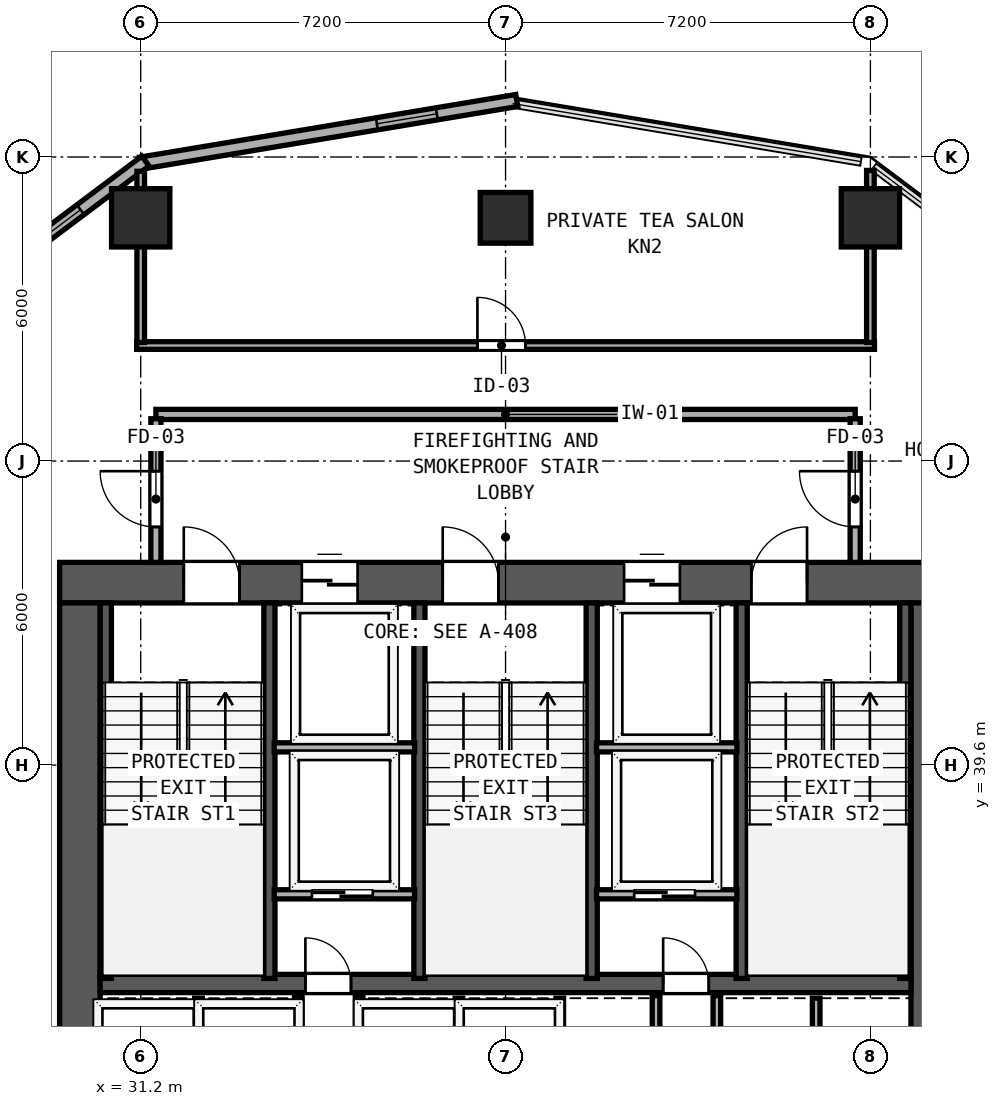
"""IFC4 building model, lengths in metres.
Left out: names, types, materials, properties, quantities, classifications, styles, units other than length and angle.
Written with IfcOpenShell. Run it as: python <this file> out.ifc"""

import sys

from ifc_helpers import new_model, si_unit, direction, frame, frame_2d, origin, origin_2d, place, context, subcontext, project, spatial, rectangle, hollow_rectangle, extrude, element, fill, save


model = new_model("IFC4")
c1 = context("Model", 3, precision=1e-05, world=origin(), true_north=direction((0.0, 1.0)))
c2 = subcontext(c1, "Body", "Model", "MODEL_VIEW")
j1 = project(units=[si_unit("LENGTHUNIT", "METRE"), si_unit("PLANEANGLEUNIT", "RADIAN")], contexts=[c1])
p1 = place(None, origin())
s1 = spatial("IfcSite", under=j1, at=p1, CompositionType="ELEMENT")
p2 = place(p1, origin())
s2 = spatial("IfcBuilding", under=s1, at=p2, CompositionType="ELEMENT")
p3 = place(p2, frame((0.0, 0.0, 55.2)))
s3 = spatial("IfcBuildingStorey", under=s2, at=p3, CompositionType="ELEMENT", Elevation=55.2)
p4 = place(p3, frame((29.6, 43.2, 0.0), z_axis=(0.0, 0.0, 1.0), x_axis=(1.0, 0.0, 0.0)))
e1 = element("IfcWall", 1, at=p4, inside=s3, PredefinedType="SHEAR", context=c2, shape_type="SweptSolid", body=[
    extrude(rectangle(XDim=17.6, YDim=0.8, at=frame_2d((8.8, 0.0))), origin(), (0.0, 0.0, 1.0), 3.6),
])
p5 = place(p4, frame((2.45, 0.0, 0.0)))
e2 = element("IfcOpeningElement", 2, at=p5, cuts=e1, PredefinedType="OPENING", context=c2, shape_type="SweptSolid", body=[
    extrude(rectangle(XDim=1.1, YDim=2.15, at=frame_2d((0.55, 1.075))), frame((0.0, 0.41, 0.0), z_axis=(0.0, -1.0, 0.0), x_axis=(1.0, 0.0, 0.0)), (0.0, 0.0, 1.0), 0.82),
])
p6 = place(p4, frame((7.56, 0.0, 0.0)))
e3 = element("IfcOpeningElement", 3, at=p6, cuts=e1, PredefinedType="OPENING", context=c2, shape_type="SweptSolid", body=[
    extrude(rectangle(XDim=1.1, YDim=2.15, at=frame_2d((0.55, 1.075))), frame((0.0, 0.41, 0.0), z_axis=(0.0, -1.0, 0.0), x_axis=(1.0, 0.0, 0.0)), (0.0, 0.0, 1.0), 0.82),
])
p7 = place(p4, frame((13.65, 0.0, 0.0)))
e4 = element("IfcOpeningElement", 4, at=p7, cuts=e1, PredefinedType="OPENING", context=c2, shape_type="SweptSolid", body=[
    extrude(rectangle(XDim=1.1, YDim=2.15, at=frame_2d((0.55, 1.075))), frame((0.0, 0.41, 0.0), z_axis=(0.0, -1.0, 0.0), x_axis=(1.0, 0.0, 0.0)), (0.0, 0.0, 1.0), 0.82),
])
p8 = place(p4, frame((4.78, 0.0, 0.0)))
e5 = element("IfcOpeningElement", 5, at=p8, cuts=e1, PredefinedType="OPENING", context=c2, shape_type="SweptSolid", body=[
    extrude(rectangle(XDim=1.1, YDim=2.2, at=frame_2d((0.55, 1.1))), frame((0.0, 0.41, 0.0), z_axis=(0.0, -1.0, 0.0), x_axis=(1.0, 0.0, 0.0)), (0.0, 0.0, 1.0), 0.82),
])
p9 = place(p4, frame((11.14, 0.0, 0.0)))
e6 = element("IfcOpeningElement", 6, at=p9, cuts=e1, PredefinedType="OPENING", context=c2, shape_type="SweptSolid", body=[
    extrude(rectangle(XDim=1.1, YDim=2.2, at=frame_2d((0.55, 1.1))), frame((0.0, 0.41, 0.0), z_axis=(0.0, -1.0, 0.0), x_axis=(1.0, 0.0, 0.0)), (0.0, 0.0, 1.0), 0.82),
])
for number, where, z_axis, x_axis in (
    (7, (30.0, 32.8, 0.0), (0.0, 0.0, 1.0), (0.0, 1.0, 0.0)),
    (8, (46.8, 32.8, 0.0), (0.0, 0.0, 1.0), (0.0, 1.0, 0.0)),
):
    element("IfcWall", number, at=place(p3, frame(where, z_axis=z_axis, x_axis=x_axis)), inside=s3, PredefinedType="SHEAR", context=c2, shape_type="SweptSolid", body=[
        extrude(rectangle(XDim=10.0, YDim=0.8, at=frame_2d((5.0, 0.0))), origin(), (0.0, 0.0, 1.0), 3.6),
    ])
p10 = place(p3, frame((30.4, 35.29, 0.0), z_axis=(0.0, 0.0, 1.0), x_axis=(1.0, 0.0, 0.0)))
e9 = element("IfcWall", 9, at=p10, inside=s3, PredefinedType="SHEAR", context=c2, shape_type="SweptSolid", body=[
    extrude(rectangle(XDim=16.0, YDim=0.36, at=frame_2d((8.0, 0.0))), origin(), (0.0, 0.0, 1.0), 3.6),
])
p11 = place(p10, frame((4.95, 0.0, 0.0), z_axis=(0.0, 0.0, 1.0), x_axis=(-1.0, 0.0, 0.0)))
e10 = element("IfcOpeningElement", 10, at=p11, cuts=e9, PredefinedType="OPENING", context=c2, shape_type="SweptSolid", body=[
    extrude(rectangle(XDim=0.9, YDim=2.1, at=frame_2d((0.45, 1.05))), frame((0.0, 0.19, 0.0), z_axis=(0.0, -1.0, 0.0), x_axis=(1.0, 0.0, 0.0)), (0.0, 0.0, 1.0), 0.38),
])
p12 = place(p10, frame((12.01, 0.0, 0.0), z_axis=(0.0, 0.0, 1.0), x_axis=(-1.0, 0.0, 0.0)))
e11 = element("IfcOpeningElement", 11, at=p12, cuts=e9, PredefinedType="OPENING", context=c2, shape_type="SweptSolid", body=[
    extrude(rectangle(XDim=0.9, YDim=2.1, at=frame_2d((0.45, 1.05))), frame((0.0, 0.19, 0.0), z_axis=(0.0, -1.0, 0.0), x_axis=(1.0, 0.0, 0.0)), (0.0, 0.0, 1.0), 0.38),
])
for number, where, z_axis, x_axis in (
    (12, (30.512, 35.39, 0.0), (0.0, 0.0, 1.0), (0.0, 1.0, 0.0)),
    (13, (33.74, 35.39, 0.0), (0.0, 0.0, 1.0), (0.0, 1.0, 0.0)),
    (14, (36.7, 35.39, 0.0), (0.0, 0.0, 1.0), (0.0, 1.0, 0.0)),
    (15, (40.1, 35.39, 0.0), (0.0, 0.0, 1.0), (0.0, 1.0, 0.0)),
    (16, (43.06, 35.39, 0.0), (0.0, 0.0, 1.0), (0.0, 1.0, 0.0)),
    (17, (46.288, 35.39, 0.0), (0.0, 0.0, 1.0), (0.0, 1.0, 0.0)),
):
    element("IfcWall", number, at=place(p3, frame(where, z_axis=z_axis, x_axis=x_axis)), inside=s3, PredefinedType="SHEAR", context=c2, shape_type="SweptSolid", body=[
        extrude(rectangle(XDim=7.41, YDim=0.22, at=frame_2d((3.705, 0.0))), origin(), (0.0, 0.0, 1.0), 3.6),
    ])
for number, where, z_axis, x_axis in (
    (18, (31.2, 50.4, 0.0), (0.0, 0.0, 1.0), (1.0, 0.0, 0.0)),
    (19, (45.6, 50.4, 0.0), (0.0, 0.0, 1.0), (1.0, 0.0, 0.0)),
):
    element("IfcColumn", number, at=place(p3, frame(where, z_axis=z_axis, x_axis=x_axis)), inside=s3, PredefinedType="COLUMN", context=c2, shape_type="SweptSolid", body=[
        extrude(hollow_rectangle(XDim=1.15, YDim=1.15, WallThickness=0.042, at=origin_2d()), origin(), (0.0, 0.0, 1.0), 3.8),
    ])
p13 = place(p3, frame((38.4, 50.4, 0.0), z_axis=(0.0, 0.0, 1.0), x_axis=(1.0, 0.0, 0.0)))
e20 = element("IfcColumn", 20, at=p13, inside=s3, PredefinedType="COLUMN", context=c2, shape_type="SweptSolid", body=[
    extrude(hollow_rectangle(XDim=1.0, YDim=1.0, WallThickness=0.038, at=origin_2d()), origin(), (0.0, 0.0, 1.0), 3.8),
])
p14 = place(p3, frame((38.622, 52.715, 0.0), z_axis=(0.0, 0.0, 1.0), x_axis=(-0.98639129485, -0.164414760418, 0.0)))
e21 = element("IfcWall", 21, at=p14, inside=s3, PredefinedType="SOLIDWALL", context=c2, shape_type="SweptSolid", body=[
    extrude(rectangle(XDim=7.53, YDim=0.24, at=frame_2d((3.765, 0.0))), origin(), (0.0, 0.0, 1.0), 3.6),
])
p15 = place(p14, frame((1.6, 0.0, 0.85)))
e22 = element("IfcOpeningElement", 22, at=p15, cuts=e21, PredefinedType="OPENING", context=c2, shape_type="SweptSolid", body=[
    extrude(rectangle(XDim=1.2, YDim=1.85, at=frame_2d((0.6, 0.925))), frame((0.0, 0.13, 0.0), z_axis=(0.0, -1.0, 0.0), x_axis=(1.0, 0.0, 0.0)), (0.0, 0.0, 1.0), 0.26),
])
p16 = place(p3, frame((31.292, 51.519, 0.0), z_axis=(0.0, 0.0, 1.0), x_axis=(-0.8, -0.6, 0.0)))
e23 = element("IfcWall", 23, at=p16, inside=s3, PredefinedType="SOLIDWALL", context=c2, shape_type="SweptSolid", body=[
    extrude(rectangle(XDim=6.021, YDim=0.24, at=frame_2d((3.01, 0.0))), origin(), (0.0, 0.0, 1.0), 3.6),
])
p17 = place(p16, frame((1.6, 0.0, 0.85)))
e24 = element("IfcOpeningElement", 24, at=p17, cuts=e23, PredefinedType="OPENING", context=c2, shape_type="SweptSolid", body=[
    extrude(rectangle(XDim=1.2, YDim=1.85, at=frame_2d((0.6, 0.925))), frame((0.0, 0.13, 0.0), z_axis=(0.0, -1.0, 0.0), x_axis=(1.0, 0.0, 0.0)), (0.0, 0.0, 1.0), 0.26),
])
p18 = place(p3, frame((31.5, 46.52, 0.0), z_axis=(0.0, 0.0, 1.0), x_axis=(1.0, 0.0, 0.0)))
e25 = element("IfcWall", 25, at=p18, inside=s3, PredefinedType="SOLIDWALL", context=c2, shape_type="SweptSolid", body=[
    extrude(rectangle(XDim=13.8, YDim=0.2, at=frame_2d((6.9, 0.0))), origin(), (0.0, 0.0, 1.0), 3.6),
])
p19 = place(p3, frame((31.5, 43.6, 0.0), z_axis=(0.0, 0.0, 1.0), x_axis=(0.0, 1.0, 0.0)))
e26 = element("IfcWall", 26, at=p19, inside=s3, PredefinedType="SOLIDWALL", context=c2, shape_type="SweptSolid", body=[
    extrude(rectangle(XDim=2.835, YDim=0.2, at=frame_2d((1.417, 0.0))), origin(), (0.0, 0.0, 1.0), 3.6),
])
p20 = place(p19, frame((1.8, 0.0, 0.0), z_axis=(0.0, 0.0, 1.0), x_axis=(-1.0, 0.0, 0.0)))
e27 = element("IfcOpeningElement", 27, at=p20, cuts=e26, PredefinedType="OPENING", context=c2, shape_type="SweptSolid", body=[
    extrude(rectangle(XDim=1.1, YDim=2.15, at=frame_2d((0.55, 1.075))), frame((0.0, 0.11, 0.0), z_axis=(0.0, -1.0, 0.0), x_axis=(1.0, 0.0, 0.0)), (0.0, 0.0, 1.0), 0.22),
])
p21 = place(p3, frame((45.3, 43.6, 0.0), z_axis=(0.0, 0.0, 1.0), x_axis=(0.0, 1.0, 0.0)))
e28 = element("IfcWall", 28, at=p21, inside=s3, PredefinedType="SOLIDWALL", context=c2, shape_type="SweptSolid", body=[
    extrude(rectangle(XDim=2.835, YDim=0.2, at=frame_2d((1.417, 0.0))), origin(), (0.0, 0.0, 1.0), 3.6),
])
p22 = place(p21, frame((0.7, 0.0, 0.0)))
e29 = element("IfcOpeningElement", 29, at=p22, cuts=e28, PredefinedType="OPENING", context=c2, shape_type="SweptSolid", body=[
    extrude(rectangle(XDim=1.1, YDim=2.15, at=frame_2d((0.55, 1.075))), frame((0.0, 0.11, 0.0), z_axis=(0.0, -1.0, 0.0), x_axis=(1.0, 0.0, 0.0)), (0.0, 0.0, 1.0), 0.22),
])
for number, where, z_axis, x_axis in (
    (30, (33.835, 39.95, 0.0), (0.0, 0.0, 1.0), (1.0, 0.0, 0.0)),
    (31, (40.195, 39.95, 0.0), (0.0, 0.0, 1.0), (1.0, 0.0, 0.0)),
):
    element("IfcWall", number, at=place(p3, frame(where, z_axis=z_axis, x_axis=x_axis)), inside=s3, PredefinedType="SOLIDWALL", context=c2, shape_type="SweptSolid", body=[
        extrude(rectangle(XDim=2.77, YDim=0.18, at=frame_2d((1.385, 0.0))), origin(), (0.0, 0.0, 1.0), 3.6),
    ])
p23 = place(p3, frame((33.835, 37.05, 0.0), z_axis=(0.0, 0.0, 1.0), x_axis=(1.0, 0.0, 0.0)))
e32 = element("IfcWall", 32, at=p23, inside=s3, PredefinedType="SOLIDWALL", context=c2, shape_type="SweptSolid", body=[
    extrude(rectangle(XDim=2.77, YDim=0.18, at=frame_2d((1.385, 0.0))), origin(), (0.0, 0.0, 1.0), 3.6),
])
p24 = place(p23, frame((1.945, 0.0, 0.0), z_axis=(0.0, 0.0, 1.0), x_axis=(-1.0, 0.0, 0.0)))
e33 = element("IfcOpeningElement", 33, at=p24, cuts=e32, PredefinedType="OPENING", context=c2, shape_type="SweptSolid", body=[
    extrude(rectangle(XDim=1.2, YDim=2.2, at=frame_2d((0.6, 1.1))), frame((0.0, 0.1, 0.0), z_axis=(0.0, -1.0, 0.0), x_axis=(1.0, 0.0, 0.0)), (0.0, 0.0, 1.0), 0.2),
])
for number, where, z_axis, x_axis in (
    (34, (34.31, 32.88, 0.0), (0.0, 0.0, 1.0), (0.0, 1.0, 0.0)),
    (35, (35.51, 32.88, 0.0), (0.0, 0.0, 1.0), (0.0, 1.0, 0.0)),
):
    element("IfcWall", number, at=place(p3, frame(where, z_axis=z_axis, x_axis=x_axis)), inside=s3, PredefinedType="SOLIDWALL", context=c2, shape_type="SweptSolid", body=[
        extrude(rectangle(XDim=2.17, YDim=0.15, at=frame_2d((1.085, 0.0))), origin(), (0.0, 0.0, 1.0), 3.6),
    ])
p25 = place(p3, frame((40.195, 37.05, 0.0), z_axis=(0.0, 0.0, 1.0), x_axis=(1.0, 0.0, 0.0)))
e36 = element("IfcWall", 36, at=p25, inside=s3, PredefinedType="SOLIDWALL", context=c2, shape_type="SweptSolid", body=[
    extrude(rectangle(XDim=2.77, YDim=0.18, at=frame_2d((1.385, 0.0))), origin(), (0.0, 0.0, 1.0), 3.6),
])
p26 = place(p25, frame((1.945, 0.0, 0.0), z_axis=(0.0, 0.0, 1.0), x_axis=(-1.0, 0.0, 0.0)))
e37 = element("IfcOpeningElement", 37, at=p26, cuts=e36, PredefinedType="OPENING", context=c2, shape_type="SweptSolid", body=[
    extrude(rectangle(XDim=1.2, YDim=2.2, at=frame_2d((0.6, 1.1))), frame((0.0, 0.1, 0.0), z_axis=(0.0, -1.0, 0.0), x_axis=(1.0, 0.0, 0.0)), (0.0, 0.0, 1.0), 0.2),
])
for number, where, z_axis, x_axis in (
    (38, (41.37, 32.88, 0.0), (0.0, 0.0, 1.0), (0.0, 1.0, 0.0)),
    (39, (42.57, 32.88, 0.0), (0.0, 0.0, 1.0), (0.0, 1.0, 0.0)),
):
    element("IfcWall", number, at=place(p3, frame(where, z_axis=z_axis, x_axis=x_axis)), inside=s3, PredefinedType="SOLIDWALL", context=c2, shape_type="SweptSolid", body=[
        extrude(rectangle(XDim=2.17, YDim=0.15, at=frame_2d((1.085, 0.0))), origin(), (0.0, 0.0, 1.0), 3.6),
    ])
for number, where, z_axis, x_axis in (
    (40, (32.34, 32.95, 0.0), (0.0, 0.0, 1.0), (0.0, 1.0, 0.0)),
    (41, (37.48, 32.95, 0.0), (0.0, 0.0, 1.0), (0.0, 1.0, 0.0)),
    (42, (39.47, 32.95, 0.0), (0.0, 0.0, 1.0), (0.0, 1.0, 0.0)),
    (43, (44.53, 32.95, 0.0), (0.0, 0.0, 1.0), (0.0, 1.0, 0.0)),
):
    element("IfcWall", number, at=place(p3, frame(where, z_axis=z_axis, x_axis=x_axis)), inside=s3, PredefinedType="SOLIDWALL", context=c2, shape_type="SweptSolid", body=[
        extrude(rectangle(XDim=2.05, YDim=0.15, at=frame_2d((1.025, 0.0))), origin(), (0.0, 0.0, 1.0), 3.6),
    ])
p27 = place(p3, frame((31.12, 47.88, 0.0), z_axis=(0.0, 0.0, 1.0), x_axis=(1.0, 0.0, 0.0)))
e44 = element("IfcWall", 44, at=p27, inside=s3, PredefinedType="PARTITIONING", context=c2, shape_type="SweptSolid", body=[
    extrude(rectangle(XDim=14.56, YDim=0.15, at=frame_2d((7.28, 0.0))), origin(), (0.0, 0.0, 1.0), 3.6),
])
p28 = place(p27, frame((6.725, 0.0, 0.0)))
e45 = element("IfcOpeningElement", 45, at=p28, cuts=e44, PredefinedType="OPENING", context=c2, shape_type="SweptSolid", body=[
    extrude(rectangle(XDim=0.95, YDim=2.12, at=frame_2d((0.475, 1.06))), frame((0.0, 0.085, 0.0), z_axis=(0.0, -1.0, 0.0), x_axis=(1.0, 0.0, 0.0)), (0.0, 0.0, 1.0), 0.17),
])
p29 = place(p3, frame((31.2, 47.94, 0.0), z_axis=(0.0, 0.0, 1.0), x_axis=(0.0, 1.0, 0.0)))
e46 = element("IfcWall", 46, at=p29, inside=s3, PredefinedType="PARTITIONING", context=c2, shape_type="SweptSolid", body=[
    extrude(rectangle(XDim=3.379, YDim=0.15, at=frame_2d((1.689, 0.0))), origin(), (0.0, 0.0, 1.0), 2.985),
])
p30 = place(p3, frame((45.6, 47.94, 0.0), z_axis=(0.0, 0.0, 1.0), x_axis=(0.0, 1.0, 0.0)))
e47 = element("IfcWall", 47, at=p30, inside=s3, PredefinedType="PARTITIONING", context=c2, shape_type="SweptSolid", body=[
    extrude(rectangle(XDim=3.395, YDim=0.15, at=frame_2d((1.698, 0.0))), origin(), (0.0, 0.0, 1.0), 2.985),
])
p31 = place(p15, origin())
e48 = element("IfcWindow", 48, at=p31, inside=s3, PartitioningType="SINGLE_PANEL", PredefinedType="WINDOW", context=c2, shape_type="SweptSolid", body=[
    extrude(rectangle(XDim=1.2, YDim=1.85, at=frame_2d((0.6, 0.925))), frame((0.0, 0.03, 0.0), z_axis=(0.0, -1.0, 0.0), x_axis=(1.0, 0.0, 0.0)), (0.0, 0.0, 1.0), 0.06),
])
fill(e22, e48)
p32 = place(p17, origin())
e49 = element("IfcWindow", 49, at=p32, inside=s3, PartitioningType="SINGLE_PANEL", PredefinedType="WINDOW", context=c2, shape_type="SweptSolid", body=[
    extrude(rectangle(XDim=1.2, YDim=1.85, at=frame_2d((0.6, 0.925))), frame((0.0, 0.03, 0.0), z_axis=(0.0, -1.0, 0.0), x_axis=(1.0, 0.0, 0.0)), (0.0, 0.0, 1.0), 0.06),
])
fill(e24, e49)
p33 = place(p5, origin())
e50 = element("IfcDoor", 50, at=p33, inside=s3, OperationType="SINGLE_SWING_LEFT", PredefinedType="DOOR", context=c2, shape_type="SweptSolid", body=[
    extrude(rectangle(XDim=1.1, YDim=2.15, at=frame_2d((0.55, 1.075))), frame((0.0, 0.185, 0.0), z_axis=(0.0, -1.0, 0.0), x_axis=(1.0, 0.0, 0.0)), (0.0, 0.0, 1.0), 0.05),
])
fill(e2, e50)
p34 = place(p6, origin())
e51 = element("IfcDoor", 51, at=p34, inside=s3, OperationType="SINGLE_SWING_LEFT", PredefinedType="DOOR", context=c2, shape_type="SweptSolid", body=[
    extrude(rectangle(XDim=1.1, YDim=2.15, at=frame_2d((0.55, 1.075))), frame((0.0, 0.185, 0.0), z_axis=(0.0, -1.0, 0.0), x_axis=(1.0, 0.0, 0.0)), (0.0, 0.0, 1.0), 0.05),
])
fill(e3, e51)
p35 = place(p7, origin())
e52 = element("IfcDoor", 52, at=p35, inside=s3, OperationType="SINGLE_SWING_RIGHT", PredefinedType="DOOR", context=c2, shape_type="SweptSolid", body=[
    extrude(rectangle(XDim=1.1, YDim=2.15, at=frame_2d((0.55, 1.075))), frame((0.0, 0.185, 0.0), z_axis=(0.0, -1.0, 0.0), x_axis=(1.0, 0.0, 0.0)), (0.0, 0.0, 1.0), 0.05),
])
fill(e4, e52)
p36 = place(p20, origin())
e53 = element("IfcDoor", 53, at=p36, inside=s3, OperationType="SINGLE_SWING_LEFT", PredefinedType="DOOR", context=c2, shape_type="SweptSolid", body=[
    extrude(rectangle(XDim=1.1, YDim=2.15, at=frame_2d((0.55, 1.075))), frame((0.0, 0.025, 0.0), z_axis=(0.0, -1.0, 0.0), x_axis=(1.0, 0.0, 0.0)), (0.0, 0.0, 1.0), 0.05),
])
fill(e27, e53)
p37 = place(p22, origin())
e54 = element("IfcDoor", 54, at=p37, inside=s3, OperationType="SINGLE_SWING_RIGHT", PredefinedType="DOOR", context=c2, shape_type="SweptSolid", body=[
    extrude(rectangle(XDim=1.1, YDim=2.15, at=frame_2d((0.55, 1.075))), frame((0.0, 0.025, 0.0), z_axis=(0.0, -1.0, 0.0), x_axis=(1.0, 0.0, 0.0)), (0.0, 0.0, 1.0), 0.05),
])
fill(e29, e54)
p38 = place(p8, origin())
e55 = element("IfcDoor", 55, at=p38, inside=s3, OperationType="SLIDING_TO_LEFT", PredefinedType="DOOR", context=c2, shape_type="SweptSolid", body=[
    extrude(rectangle(XDim=1.1, YDim=2.2, at=frame_2d((0.55, 1.1))), frame((0.0, 0.185, 0.0), z_axis=(0.0, -1.0, 0.0), x_axis=(1.0, 0.0, 0.0)), (0.0, 0.0, 1.0), 0.05),
])
fill(e5, e55)
p39 = place(p9, origin())
e56 = element("IfcDoor", 56, at=p39, inside=s3, OperationType="SLIDING_TO_LEFT", PredefinedType="DOOR", context=c2, shape_type="SweptSolid", body=[
    extrude(rectangle(XDim=1.1, YDim=2.2, at=frame_2d((0.55, 1.1))), frame((0.0, 0.185, 0.0), z_axis=(0.0, -1.0, 0.0), x_axis=(1.0, 0.0, 0.0)), (0.0, 0.0, 1.0), 0.05),
])
fill(e6, e56)
p40 = place(p24, origin())
e57 = element("IfcDoor", 57, at=p40, inside=s3, OperationType="SLIDING_TO_RIGHT", PredefinedType="DOOR", context=c2, shape_type="SweptSolid", body=[
    extrude(rectangle(XDim=1.2, YDim=2.2, at=frame_2d((0.6, 1.1))), frame((0.0, 0.025, 0.0), z_axis=(0.0, -1.0, 0.0), x_axis=(1.0, 0.0, 0.0)), (0.0, 0.0, 1.0), 0.05),
])
fill(e33, e57)
p41 = place(p11, origin())
e58 = element("IfcDoor", 58, at=p41, inside=s3, OperationType="SINGLE_SWING_RIGHT", PredefinedType="DOOR", context=c2, shape_type="SweptSolid", body=[
    extrude(rectangle(XDim=0.9, YDim=2.1, at=frame_2d((0.45, 1.05))), frame((0.0, 0.025, 0.0), z_axis=(0.0, -1.0, 0.0), x_axis=(1.0, 0.0, 0.0)), (0.0, 0.0, 1.0), 0.05),
])
fill(e10, e58)
p42 = place(p26, origin())
e59 = element("IfcDoor", 59, at=p42, inside=s3, OperationType="SLIDING_TO_RIGHT", PredefinedType="DOOR", context=c2, shape_type="SweptSolid", body=[
    extrude(rectangle(XDim=1.2, YDim=2.2, at=frame_2d((0.6, 1.1))), frame((0.0, 0.025, 0.0), z_axis=(0.0, -1.0, 0.0), x_axis=(1.0, 0.0, 0.0)), (0.0, 0.0, 1.0), 0.05),
])
fill(e37, e59)
p43 = place(p12, origin())
e60 = element("IfcDoor", 60, at=p43, inside=s3, OperationType="SINGLE_SWING_RIGHT", PredefinedType="DOOR", context=c2, shape_type="SweptSolid", body=[
    extrude(rectangle(XDim=0.9, YDim=2.1, at=frame_2d((0.45, 1.05))), frame((0.0, 0.025, 0.0), z_axis=(0.0, -1.0, 0.0), x_axis=(1.0, 0.0, 0.0)), (0.0, 0.0, 1.0), 0.05),
])
fill(e11, e60)
p44 = place(p28, origin())
e61 = element("IfcDoor", 61, at=p44, inside=s3, OperationType="SINGLE_SWING_LEFT", PredefinedType="DOOR", context=c2, shape_type="SweptSolid", body=[
    extrude(rectangle(XDim=0.95, YDim=2.12, at=frame_2d((0.475, 1.06))), frame((0.0, 0.025, 0.0), z_axis=(0.0, -1.0, 0.0), x_axis=(1.0, 0.0, 0.0)), (0.0, 0.0, 1.0), 0.05),
])
fill(e45, e61)
save(model, sys.argv[1])
